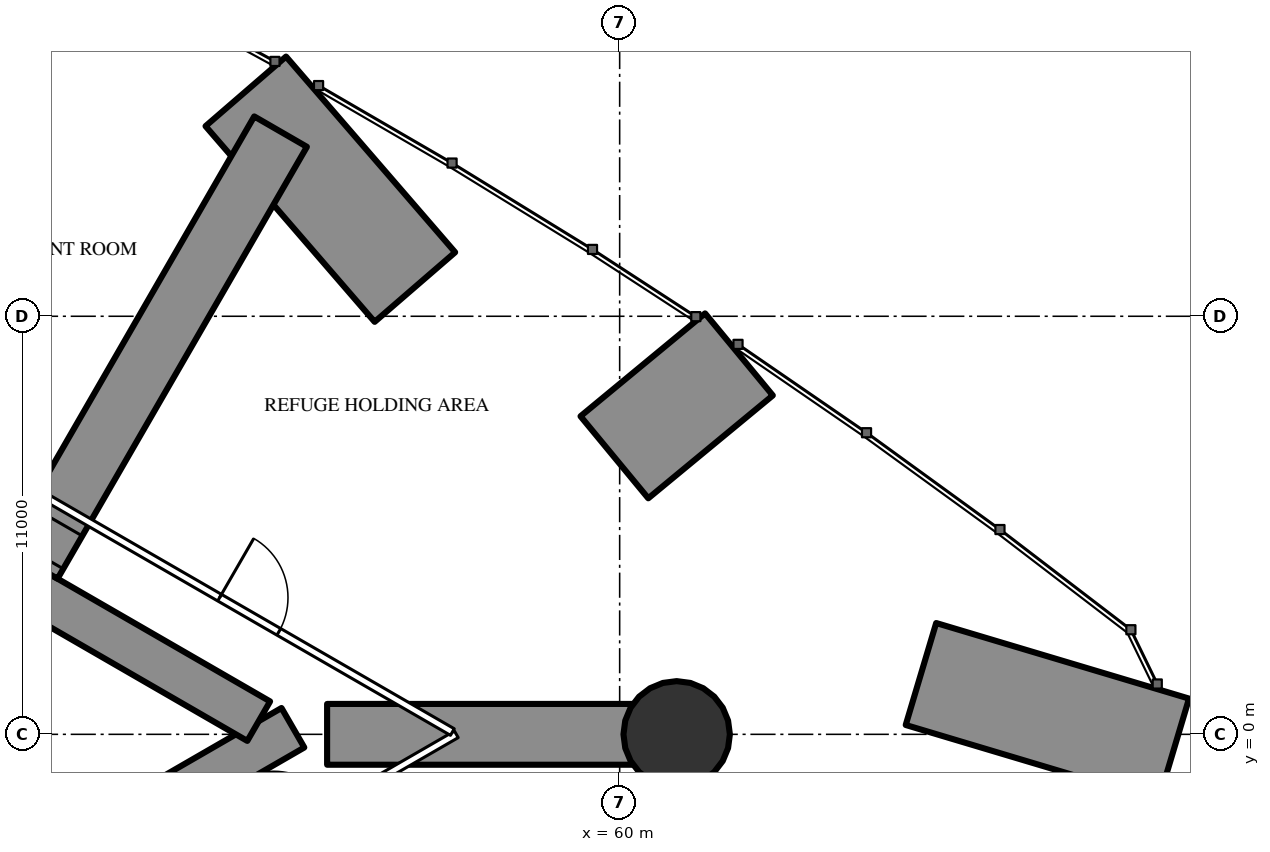
"""IFC4 building model, lengths in metres.
Left out: names, types, materials, properties, quantities, classifications, styles, units other than length and angle.
Written with IfcOpenShell. Run it as: python <this file> out.ifc"""

import sys

from ifc_helpers import new_model, si_unit, direction, frame, frame_2d, origin, origin_2d, place, context, subcontext, project, spatial, rectangle, hollow_circle, extrude, element, fill, save


model = new_model("IFC4")
c1 = context("Model", 3, precision=1e-05, world=origin(), true_north=direction((0.0, 1.0)))
c2 = subcontext(c1, "Body", "Model", "MODEL_VIEW")
j1 = project(units=[si_unit("LENGTHUNIT", "METRE"), si_unit("PLANEANGLEUNIT", "RADIAN")], contexts=[c1])
p1 = place(None, origin())
s1 = spatial("IfcSite", under=j1, at=p1, CompositionType="ELEMENT")
p2 = place(p1, origin())
s2 = spatial("IfcBuilding", under=s1, at=p2, CompositionType="ELEMENT")
p3 = place(p2, frame((0.0, 0.0, 81.0)))
s3 = spatial("IfcBuildingStorey", under=s2, at=p3, CompositionType="ELEMENT", Elevation=81.0)
p4 = place(p3, frame((74.581, -0.401, 0.0), z_axis=(0.0, 0.0, 1.0), x_axis=(-0.958128639998, 0.286338102974, 0.0)))
e1 = element("IfcWall", 1, at=p4, inside=s3, PredefinedType="SHEAR", context=c2, shape_type="SweptSolid", body=[
    extrude(rectangle(XDim=6.944, YDim=2.8, at=frame_2d((3.472, 0.0))), origin(), (0.0, 0.0, 1.0), 6.0),
])
p5 = place(p3, frame((63.139, 9.996, 0.0), z_axis=(0.0, 0.0, 1.0), x_axis=(-0.771080676244, -0.636737458238, 0.0)))
e2 = element("IfcWall", 2, at=p5, inside=s3, PredefinedType="SHEAR", context=c2, shape_type="SweptSolid", body=[
    extrude(rectangle(XDim=4.251, YDim=2.8, at=frame_2d((2.125, 0.0))), origin(), (0.0, 0.0, 1.0), 6.0),
])
p6 = place(p3, frame((50.162, 16.917, 0.0), z_axis=(0.0, 0.0, 1.0), x_axis=(0.653849594578, -0.756624548683, 0.0)))
e3 = element("IfcWall", 3, at=p6, inside=s3, PredefinedType="SHEAR", context=c2, shape_type="SweptSolid", body=[
    extrude(rectangle(XDim=6.806, YDim=2.8, at=frame_2d((3.403, 0.0))), origin(), (0.0, 0.0, 1.0), 6.0),
])
p7 = place(p3, frame((44.584, 20.752, 0.0), z_axis=(0.0, 0.0, 1.0), x_axis=(-0.785936955348, -0.618306640931, 0.0)))
e4 = element("IfcWall", 4, at=p7, inside=s3, PredefinedType="SHEAR", context=c2, shape_type="SweptSolid", body=[
    extrude(rectangle(XDim=4.222, YDim=2.8, at=frame_2d((2.111, 0.0))), origin(), (0.0, 0.0, 1.0), 6.0),
])
p8 = place(p3, frame((61.5, 0.0, 0.0), z_axis=(0.0, 0.0, 1.0), x_axis=(1.0, 0.0, 0.0)))
e5 = element("IfcColumn", 5, at=p8, inside=s3, PredefinedType="COLUMN", context=c2, shape_type="SweptSolid", body=[
    extrude(hollow_circle(Radius=1.4, WallThickness=0.1, at=origin_2d()), origin(), (0.0, 0.0, 1.0), 6.0),
])
p9 = place(p3, frame((27.2, -13.8, 0.0), z_axis=(0.0, 0.0, 1.0), x_axis=(0.866027159892, 0.499996958321, 0.0)))
e6 = element("IfcWall", 6, at=p9, inside=s3, PredefinedType="SHEAR", context=c2, shape_type="SweptSolid", body=[
    extrude(rectangle(XDim=27.947, YDim=1.2, at=frame_2d((13.973, 0.0))), origin(), (0.0, 0.0, 1.0), 6.0),
])
p10 = place(p9, frame((4.6, 0.0, 0.0)))
e7 = element("IfcOpeningElement", 7, at=p10, cuts=e6, PredefinedType="OPENING", context=c2, shape_type="SweptSolid", body=[
    extrude(rectangle(XDim=1.0, YDim=2.2, at=frame_2d((0.5, 1.1))), frame((0.0, 0.61, 0.0), z_axis=(0.0, -1.0, 0.0), x_axis=(1.0, 0.0, 0.0)), (0.0, 0.0, 1.0), 1.22),
])
p11 = place(p9, frame((13.568, 0.0, 0.0)))
e8 = element("IfcOpeningElement", 8, at=p11, cuts=e6, PredefinedType="OPENING", context=c2, shape_type="SweptSolid", body=[
    extrude(rectangle(XDim=1.8, YDim=2.2, at=frame_2d((0.9, 1.1))), frame((0.0, 0.61, 0.0), z_axis=(0.0, -1.0, 0.0), x_axis=(1.0, 0.0, 0.0)), (0.0, 0.0, 1.0), 1.22),
])
p12 = place(p3, frame((27.2, 13.8, 0.0), z_axis=(0.0, 0.0, 1.0), x_axis=(0.866024515034, -0.500001539357, 0.0)))
e9 = element("IfcWall", 9, at=p12, inside=s3, PredefinedType="SHEAR", context=c2, shape_type="SweptSolid", body=[
    extrude(rectangle(XDim=26.907, YDim=1.2, at=frame_2d((13.454, 0.0))), origin(), (0.0, 0.0, 1.0), 6.0),
])
p13 = place(p12, frame((4.6, 0.0, 0.0)))
e10 = element("IfcOpeningElement", 10, at=p13, cuts=e9, PredefinedType="OPENING", context=c2, shape_type="SweptSolid", body=[
    extrude(rectangle(XDim=1.0, YDim=2.2, at=frame_2d((0.5, 1.1))), frame((0.0, 0.61, 0.0), z_axis=(0.0, -1.0, 0.0), x_axis=(1.0, 0.0, 0.0)), (0.0, 0.0, 1.0), 1.22),
])
p14 = place(p12, frame((13.568, 0.0, 0.0)))
e11 = element("IfcOpeningElement", 11, at=p14, cuts=e9, PredefinedType="OPENING", context=c2, shape_type="SweptSolid", body=[
    extrude(rectangle(XDim=1.8, YDim=2.2, at=frame_2d((0.9, 1.1))), frame((0.0, 0.61, 0.0), z_axis=(0.0, -1.0, 0.0), x_axis=(1.0, 0.0, 0.0)), (0.0, 0.0, 1.0), 1.22),
])
p15 = place(p3, frame((52.302, 0.0, 0.0), z_axis=(0.0, 0.0, 1.0), x_axis=(1.0, 0.0, 0.0)))
e12 = element("IfcWall", 12, at=p15, inside=s3, PredefinedType="SHEAR", context=c2, shape_type="SweptSolid", body=[
    extrude(rectangle(XDim=9.198, YDim=1.6, at=frame_2d((4.599, 0.0))), origin(), (0.0, 0.0, 1.0), 6.0),
])
p16 = place(p3, frame((44.517, 4.495, 0.0), z_axis=(0.0, 0.0, 1.0), x_axis=(0.500003233568, 0.866023536875, 0.0)))
e13 = element("IfcWall", 13, at=p16, inside=s3, PredefinedType="SHEAR", context=c2, shape_type="SweptSolid", body=[
    extrude(rectangle(XDim=13.122, YDim=1.6, at=frame_2d((6.561, 0.0))), origin(), (0.0, 0.0, 1.0), 6.0),
])
p17 = place(p16, frame((0.3, 0.0, 0.0)))
e14 = element("IfcOpeningElement", 14, at=p17, cuts=e13, PredefinedType="OPENING", context=c2, shape_type="SweptSolid", body=[
    extrude(rectangle(XDim=1.0, YDim=2.2, at=frame_2d((0.5, 1.1))), frame((0.0, 0.81, 0.0), z_axis=(0.0, -1.0, 0.0), x_axis=(1.0, 0.0, 0.0)), (0.0, 0.0, 1.0), 1.62),
])
p18 = place(p3, frame((37.96, -10.243, 0.0), z_axis=(0.0, 0.0, 1.0), x_axis=(0.866026429433, 0.499998223521, 0.0)))
e15 = element("IfcWall", 15, at=p18, inside=s3, PredefinedType="PARTITIONING", context=c2, shape_type="SweptSolid", body=[
    extrude(rectangle(XDim=20.487, YDim=0.2, at=frame_2d((10.243, 0.0))), origin(), (0.0, 0.0, 1.0), 5.75),
])
p19 = place(p18, frame((14.943, 0.0, 0.0)))
e16 = element("IfcOpeningElement", 16, at=p19, cuts=e15, PredefinedType="OPENING", context=c2, shape_type="SweptSolid", body=[
    extrude(rectangle(XDim=1.8, YDim=2.2, at=frame_2d((0.9, 1.1))), frame((0.0, 0.11, 0.0), z_axis=(0.0, -1.0, 0.0), x_axis=(1.0, 0.0, 0.0)), (0.0, 0.0, 1.0), 0.22),
])
p20 = place(p18, frame((5.2, 0.0, 0.0)))
e17 = element("IfcOpeningElement", 17, at=p20, cuts=e15, PredefinedType="OPENING", context=c2, shape_type="SweptSolid", body=[
    extrude(rectangle(XDim=1.8, YDim=2.2, at=frame_2d((0.9, 1.1))), frame((0.0, 0.11, 0.0), z_axis=(0.0, -1.0, 0.0), x_axis=(1.0, 0.0, 0.0)), (0.0, 0.0, 1.0), 0.22),
])
p21 = place(p3, frame((36.834, 10.894, 0.0), z_axis=(0.0, 0.0, 1.0), x_axis=(0.866028157229, -0.499995230863, 0.0)))
e18 = element("IfcWall", 18, at=p21, inside=s3, PredefinedType="PARTITIONING", context=c2, shape_type="SweptSolid", body=[
    extrude(rectangle(XDim=21.667, YDim=0.2, at=frame_2d((10.833, 0.0))), origin(), (0.0, 0.0, 1.0), 5.75),
])
p22 = place(p21, frame((14.594, 0.0, 0.0)))
e19 = element("IfcOpeningElement", 19, at=p22, cuts=e18, PredefinedType="OPENING", context=c2, shape_type="SweptSolid", body=[
    extrude(rectangle(XDim=1.8, YDim=2.2, at=frame_2d((0.9, 1.1))), frame((0.0, 0.11, 0.0), z_axis=(0.0, -1.0, 0.0), x_axis=(1.0, 0.0, 0.0)), (0.0, 0.0, 1.0), 0.22),
])
p23 = place(p21, frame((4.073, 0.0, 0.0)))
e20 = element("IfcOpeningElement", 20, at=p23, cuts=e18, PredefinedType="OPENING", context=c2, shape_type="SweptSolid", body=[
    extrude(rectangle(XDim=2.0, YDim=2.4, at=frame_2d((1.0, 1.2))), frame((0.0, 0.11, 0.0), z_axis=(0.0, -1.0, 0.0), x_axis=(1.0, 0.0, 0.0)), (0.0, 0.0, 1.0), 0.22),
])
p24 = place(p17, origin())
e21 = element("IfcDoor", 21, at=p24, inside=s3, OperationType="SINGLE_SWING_LEFT", PredefinedType="DOOR", context=c2, shape_type="SweptSolid", body=[
    extrude(rectangle(XDim=1.0, YDim=2.2, at=frame_2d((0.5, 1.1))), frame((0.0, 0.025, 0.0), z_axis=(0.0, -1.0, 0.0), x_axis=(1.0, 0.0, 0.0)), (0.0, 0.0, 1.0), 0.05),
])
fill(e14, e21)
p25 = place(p22, origin())
e22 = element("IfcDoor", 22, at=p25, inside=s3, OperationType="DOUBLE_DOOR_SINGLE_SWING", PredefinedType="DOOR", context=c2, shape_type="SweptSolid", body=[
    extrude(rectangle(XDim=1.8, YDim=2.2, at=frame_2d((0.9, 1.1))), frame((0.0, 0.025, 0.0), z_axis=(0.0, -1.0, 0.0), x_axis=(1.0, 0.0, 0.0)), (0.0, 0.0, 1.0), 0.05),
])
fill(e19, e22)
save(model, sys.argv[1])
